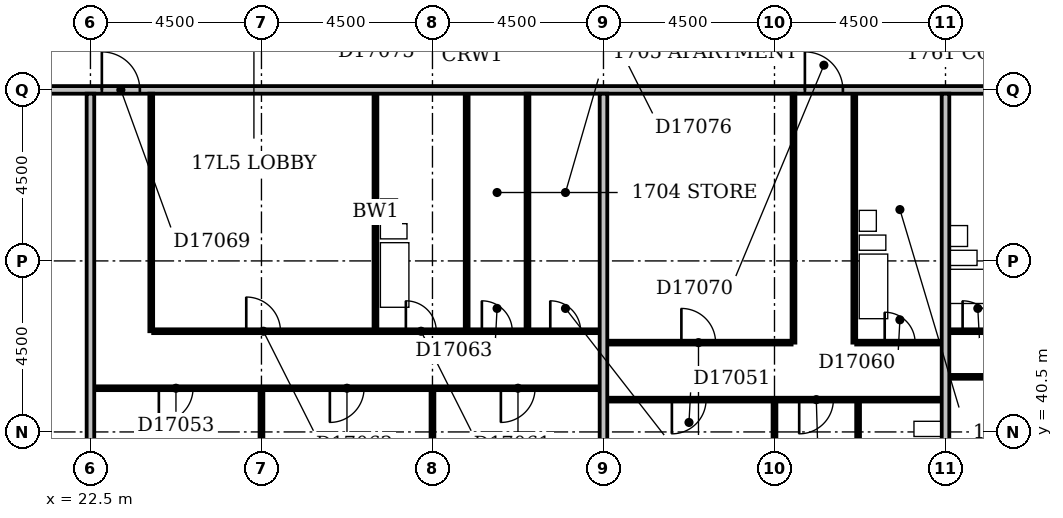
"""IFC4 building model, lengths in metres.
Left out: names, types, materials, properties, quantities, classifications, styles, units other than length and angle.
Written with IfcOpenShell. Run it as: python <this file> out.ifc"""

import sys

from ifc_helpers import new_model, si_unit, direction, frame, frame_2d, origin, place, context, subcontext, project, spatial, rectangle, extrude, element, fill, save


model = new_model("IFC4")
c1 = context("Model", 3, precision=1e-05, world=origin(), true_north=direction((0.0, 1.0)))
c2 = subcontext(c1, "Body", "Model", "MODEL_VIEW")
j1 = project(units=[si_unit("LENGTHUNIT", "METRE"), si_unit("PLANEANGLEUNIT", "RADIAN")], contexts=[c1])
p1 = place(None, origin())
s1 = spatial("IfcSite", under=j1, at=p1, CompositionType="ELEMENT")
p2 = place(p1, origin())
s2 = spatial("IfcBuilding", under=s1, at=p2, CompositionType="ELEMENT")
p3 = place(p2, frame((0.0, 0.0, 72.2)))
s3 = spatial("IfcBuildingStorey", under=s2, at=p3, CompositionType="ELEMENT", Elevation=72.2)
p4 = place(p3, frame((22.5, 36.6, 0.0), z_axis=(0.0, 0.0, 1.0), x_axis=(0.0, 1.0, 0.0)))
e1 = element("IfcWall", 1, at=p4, inside=s3, PredefinedType="PARTITIONING", context=c2, shape_type="SweptSolid", body=[
    extrude(rectangle(XDim=12.8, YDim=0.2, at=frame_2d((6.4, 0.0))), origin(), (0.0, 0.0, 1.0), 3.3),
])
p5 = place(p3, frame((27.0, 36.6, 0.0), z_axis=(0.0, 0.0, 1.0), x_axis=(0.0, 1.0, 0.0)))
e2 = element("IfcWall", 2, at=p5, inside=s3, PredefinedType="PARTITIONING", context=c2, shape_type="SweptSolid", body=[
    extrude(rectangle(XDim=5.0, YDim=0.1, at=frame_2d((2.5, 0.0))), origin(), (0.0, 0.0, 1.0), 2.6),
])
p6 = place(p3, frame((31.5, 36.6, 0.0), z_axis=(0.0, 0.0, 1.0), x_axis=(0.0, 1.0, 0.0)))
e3 = element("IfcWall", 3, at=p6, inside=s3, PredefinedType="PARTITIONING", context=c2, shape_type="SweptSolid", body=[
    extrude(rectangle(XDim=5.0, YDim=0.1, at=frame_2d((2.5, 0.0))), origin(), (0.0, 0.0, 1.0), 3.3),
])
p7 = place(p3, frame((36.0, 36.6, 0.0), z_axis=(0.0, 0.0, 1.0), x_axis=(0.0, 1.0, 0.0)))
e4 = element("IfcWall", 4, at=p7, inside=s3, PredefinedType="PARTITIONING", context=c2, shape_type="SweptSolid", body=[
    extrude(rectangle(XDim=12.8, YDim=0.2, at=frame_2d((6.4, 0.0))), origin(), (0.0, 0.0, 1.0), 2.4),
])
p8 = place(p3, frame((40.5, 36.6, 0.0), z_axis=(0.0, 0.0, 1.0), x_axis=(0.0, 1.0, 0.0)))
e5 = element("IfcWall", 5, at=p8, inside=s3, PredefinedType="PARTITIONING", context=c2, shape_type="SweptSolid", body=[
    extrude(rectangle(XDim=4.7, YDim=0.1, at=frame_2d((2.35, 0.0))), origin(), (0.0, 0.0, 1.0), 3.3),
])
p9 = place(p3, frame((45.0, 36.6, 0.0), z_axis=(0.0, 0.0, 1.0), x_axis=(0.0, 1.0, 0.0)))
e6 = element("IfcWall", 6, at=p9, inside=s3, PredefinedType="PARTITIONING", context=c2, shape_type="SweptSolid", body=[
    extrude(rectangle(XDim=12.8, YDim=0.2, at=frame_2d((6.4, 0.0))), origin(), (0.0, 0.0, 1.0), 2.6),
])
p10 = place(p3, frame((42.7, 38.45, 0.0), z_axis=(0.0, 0.0, 1.0), x_axis=(0.0, 1.0, 0.0)))
e7 = element("IfcWall", 7, at=p10, inside=s3, PredefinedType="PLUMBINGWALL", context=c2, shape_type="SweptSolid", body=[
    extrude(rectangle(XDim=2.85, YDim=0.1, at=frame_2d((1.425, 0.0))), origin(), (0.0, 0.0, 1.0), 3.3),
])
p11 = place(p10, frame((1.05, 0.0, 0.0)))
e8 = element("IfcOpeningElement", 8, at=p11, cuts=e7, PredefinedType="OPENING", context=c2, shape_type="SweptSolid", body=[
    extrude(rectangle(XDim=0.8, YDim=2.1, at=frame_2d((0.4, 1.05))), frame((0.0, 0.062, 0.0), z_axis=(0.0, -1.0, 0.0), x_axis=(1.0, 0.0, 0.0)), (0.0, 0.0, 1.0), 0.124),
])
p12 = place(p3, frame((36.1, 41.35, 0.0), z_axis=(0.0, 0.0, 1.0), x_axis=(1.0, 0.0, 0.0)))
e9 = element("IfcWall", 9, at=p12, inside=s3, PredefinedType="PARTITIONING", context=c2, shape_type="SweptSolid", body=[
    extrude(rectangle(XDim=8.8, YDim=0.1, at=frame_2d((4.4, 0.0))), origin(), (0.0, 0.0, 1.0), 3.3),
])
p13 = place(p12, frame((1.7, 0.0, 0.0)))
e10 = element("IfcOpeningElement", 10, at=p13, cuts=e9, PredefinedType="OPENING", context=c2, shape_type="SweptSolid", body=[
    extrude(rectangle(XDim=0.9, YDim=2.1, at=frame_2d((0.45, 1.05))), frame((0.0, 0.062, 0.0), z_axis=(0.0, -1.0, 0.0), x_axis=(1.0, 0.0, 0.0)), (0.0, 0.0, 1.0), 0.124),
])
p14 = place(p12, frame((5.05, 0.0, 0.0)))
e11 = element("IfcOpeningElement", 11, at=p14, cuts=e9, PredefinedType="OPENING", context=c2, shape_type="SweptSolid", body=[
    extrude(rectangle(XDim=0.9, YDim=2.1, at=frame_2d((0.45, 1.05))), frame((0.0, 0.062, 0.0), z_axis=(0.0, -1.0, 0.0), x_axis=(1.0, 0.0, 0.0)), (0.0, 0.0, 1.0), 0.124),
])
p15 = place(p3, frame((22.6, 41.65, 0.0), z_axis=(0.0, 0.0, 1.0), x_axis=(1.0, 0.0, 0.0)))
e12 = element("IfcWall", 12, at=p15, inside=s3, PredefinedType="PARTITIONING", context=c2, shape_type="SweptSolid", body=[
    extrude(rectangle(XDim=13.3, YDim=0.1, at=frame_2d((6.65, 0.0))), origin(), (0.0, 0.0, 1.0), 3.3),
])
p16 = place(p15, frame((1.7, 0.0, 0.0)))
e13 = element("IfcOpeningElement", 13, at=p16, cuts=e12, PredefinedType="OPENING", context=c2, shape_type="SweptSolid", body=[
    extrude(rectangle(XDim=0.9, YDim=2.1, at=frame_2d((0.45, 1.05))), frame((0.0, 0.062, 0.0), z_axis=(0.0, -1.0, 0.0), x_axis=(1.0, 0.0, 0.0)), (0.0, 0.0, 1.0), 0.124),
])
p17 = place(p15, frame((6.2, 0.0, 0.0)))
e14 = element("IfcOpeningElement", 14, at=p17, cuts=e12, PredefinedType="OPENING", context=c2, shape_type="SweptSolid", body=[
    extrude(rectangle(XDim=0.9, YDim=2.1, at=frame_2d((0.45, 1.05))), frame((0.0, 0.062, 0.0), z_axis=(0.0, -1.0, 0.0), x_axis=(1.0, 0.0, 0.0)), (0.0, 0.0, 1.0), 0.124),
])
p18 = place(p15, frame((10.7, 0.0, 0.0)))
e15 = element("IfcOpeningElement", 15, at=p18, cuts=e12, PredefinedType="OPENING", context=c2, shape_type="SweptSolid", body=[
    extrude(rectangle(XDim=0.9, YDim=2.1, at=frame_2d((0.45, 1.05))), frame((0.0, 0.062, 0.0), z_axis=(0.0, -1.0, 0.0), x_axis=(1.0, 0.0, 0.0)), (0.0, 0.0, 1.0), 0.124),
])
p19 = place(p3, frame((45.1, 41.95, 0.0), z_axis=(0.0, 0.0, 1.0), x_axis=(1.0, 0.0, 0.0)))
e16 = element("IfcWall", 16, at=p19, inside=s3, PredefinedType="PARTITIONING", context=c2, shape_type="SweptSolid", body=[
    extrude(rectangle(XDim=4.3, YDim=0.1, at=frame_2d((2.15, 0.0))), origin(), (0.0, 0.0, 1.0), 3.3),
])
p20 = place(p19, frame((1.7, 0.0, 0.0)))
e17 = element("IfcOpeningElement", 17, at=p20, cuts=e16, PredefinedType="OPENING", context=c2, shape_type="SweptSolid", body=[
    extrude(rectangle(XDim=0.9, YDim=2.1, at=frame_2d((0.45, 1.05))), frame((0.0, 0.062, 0.0), z_axis=(0.0, -1.0, 0.0), x_axis=(1.0, 0.0, 0.0)), (0.0, 0.0, 1.0), 0.124),
])
p21 = place(p3, frame((36.1, 42.85, 0.0), z_axis=(0.0, 0.0, 1.0), x_axis=(1.0, 0.0, 0.0)))
e18 = element("IfcWall", 18, at=p21, inside=s3, PredefinedType="PARTITIONING", context=c2, shape_type="SweptSolid", body=[
    extrude(rectangle(XDim=4.85, YDim=0.1, at=frame_2d((2.425, 0.0))), origin(), (0.0, 0.0, 1.0), 3.3),
])
p22 = place(p21, frame((1.95, 0.0, 0.0)))
e19 = element("IfcOpeningElement", 19, at=p22, cuts=e18, PredefinedType="OPENING", context=c2, shape_type="SweptSolid", body=[
    extrude(rectangle(XDim=0.9, YDim=2.1, at=frame_2d((0.45, 1.05))), frame((0.0, 0.062, 0.0), z_axis=(0.0, -1.0, 0.0), x_axis=(1.0, 0.0, 0.0)), (0.0, 0.0, 1.0), 0.124),
])
p23 = place(p3, frame((41.0, 42.85, 0.0), z_axis=(0.0, 0.0, 1.0), x_axis=(0.0, 1.0, 0.0)))
e20 = element("IfcWall", 20, at=p23, inside=s3, PredefinedType="PARTITIONING", context=c2, shape_type="SweptSolid", body=[
    extrude(rectangle(XDim=6.55, YDim=0.1, at=frame_2d((3.275, 0.0))), origin(), (0.0, 0.0, 1.0), 3.3),
])
p24 = place(p3, frame((42.6, 42.85, 0.0), z_axis=(0.0, 0.0, 1.0), x_axis=(0.0, 1.0, 0.0)))
e21 = element("IfcWall", 21, at=p24, inside=s3, PredefinedType="PLUMBINGWALL", context=c2, shape_type="SweptSolid", body=[
    extrude(rectangle(XDim=6.55, YDim=0.1, at=frame_2d((3.275, 0.0))), origin(), (0.0, 0.0, 1.0), 3.3),
])
p25 = place(p3, frame((42.65, 42.85, 0.0), z_axis=(0.0, 0.0, 1.0), x_axis=(1.0, 0.0, 0.0)))
e22 = element("IfcWall", 22, at=p25, inside=s3, PredefinedType="PARTITIONING", context=c2, shape_type="SweptSolid", body=[
    extrude(rectangle(XDim=2.25, YDim=0.1, at=frame_2d((1.125, 0.0))), origin(), (0.0, 0.0, 1.0), 3.3),
])
p26 = place(p25, frame((0.75, 0.0, 0.0)))
e23 = element("IfcOpeningElement", 23, at=p26, cuts=e22, PredefinedType="OPENING", context=c2, shape_type="SweptSolid", body=[
    extrude(rectangle(XDim=0.8, YDim=2.1, at=frame_2d((0.4, 1.05))), frame((0.0, 0.062, 0.0), z_axis=(0.0, -1.0, 0.0), x_axis=(1.0, 0.0, 0.0)), (0.0, 0.0, 1.0), 0.124),
])
p27 = place(p3, frame((24.1, 43.15, 0.0), z_axis=(0.0, 0.0, 1.0), x_axis=(0.0, 1.0, 0.0)))
e24 = element("IfcWall", 24, at=p27, inside=s3, PredefinedType="PARTITIONING", context=c2, shape_type="SweptSolid", body=[
    extrude(rectangle(XDim=6.25, YDim=0.1, at=frame_2d((3.125, 0.0))), origin(), (0.0, 0.0, 1.0), 3.3),
])
p28 = place(p3, frame((24.15, 43.15, 0.0), z_axis=(0.0, 0.0, 1.0), x_axis=(1.0, 0.0, 0.0)))
e25 = element("IfcWall", 25, at=p28, inside=s3, PredefinedType="PARTITIONING", context=c2, shape_type="SweptSolid", body=[
    extrude(rectangle(XDim=11.75, YDim=0.1, at=frame_2d((5.875, 0.0))), origin(), (0.0, 0.0, 1.0), 3.3),
])
p29 = place(p28, frame((6.65, 0.0, 0.0)))
e26 = element("IfcOpeningElement", 26, at=p29, cuts=e25, PredefinedType="OPENING", context=c2, shape_type="SweptSolid", body=[
    extrude(rectangle(XDim=0.8, YDim=2.1, at=frame_2d((0.4, 1.05))), frame((0.0, 0.062, 0.0), z_axis=(0.0, -1.0, 0.0), x_axis=(1.0, 0.0, 0.0)), (0.0, 0.0, 1.0), 0.124),
])
p30 = place(p28, frame((2.45, 0.0, 0.0)))
e27 = element("IfcOpeningElement", 27, at=p30, cuts=e25, PredefinedType="OPENING", context=c2, shape_type="SweptSolid", body=[
    extrude(rectangle(XDim=0.9, YDim=2.1, at=frame_2d((0.45, 1.05))), frame((0.0, 0.062, 0.0), z_axis=(0.0, -1.0, 0.0), x_axis=(1.0, 0.0, 0.0)), (0.0, 0.0, 1.0), 0.124),
])
p31 = place(p28, frame((8.65, 0.0, 0.0)))
e28 = element("IfcOpeningElement", 28, at=p31, cuts=e25, PredefinedType="OPENING", context=c2, shape_type="SweptSolid", body=[
    extrude(rectangle(XDim=0.8, YDim=2.1, at=frame_2d((0.4, 1.05))), frame((0.0, 0.062, 0.0), z_axis=(0.0, -1.0, 0.0), x_axis=(1.0, 0.0, 0.0)), (0.0, 0.0, 1.0), 0.124),
])
p32 = place(p28, frame((10.45, 0.0, 0.0)))
e29 = element("IfcOpeningElement", 29, at=p32, cuts=e25, PredefinedType="OPENING", context=c2, shape_type="SweptSolid", body=[
    extrude(rectangle(XDim=0.8, YDim=2.1, at=frame_2d((0.4, 1.05))), frame((0.0, 0.062, 0.0), z_axis=(0.0, -1.0, 0.0), x_axis=(1.0, 0.0, 0.0)), (0.0, 0.0, 1.0), 0.124),
])
p33 = place(p3, frame((45.1, 43.15, 0.0), z_axis=(0.0, 0.0, 1.0), x_axis=(1.0, 0.0, 0.0)))
e30 = element("IfcWall", 30, at=p33, inside=s3, PredefinedType="PARTITIONING", context=c2, shape_type="SweptSolid", body=[
    extrude(rectangle(XDim=1.55, YDim=0.1, at=frame_2d((0.775, 0.0))), origin(), (0.0, 0.0, 1.0), 3.3),
])
p34 = place(p33, frame((0.35, 0.0, 0.0)))
e31 = element("IfcOpeningElement", 31, at=p34, cuts=e30, PredefinedType="OPENING", context=c2, shape_type="SweptSolid", body=[
    extrude(rectangle(XDim=0.8, YDim=2.1, at=frame_2d((0.4, 1.05))), frame((0.0, 0.062, 0.0), z_axis=(0.0, -1.0, 0.0), x_axis=(1.0, 0.0, 0.0)), (0.0, 0.0, 1.0), 0.124),
])
for number, where, z_axis, x_axis in (
    (32, (30.0, 43.2, 0.0), (0.0, 0.0, 1.0), (0.0, 1.0, 0.0)),
    (33, (32.4, 43.2, 0.0), (0.0, 0.0, 1.0), (0.0, 1.0, 0.0)),
):
    element("IfcWall", number, at=place(p3, frame(where, z_axis=z_axis, x_axis=x_axis)), inside=s3, PredefinedType="PLUMBINGWALL", context=c2, shape_type="SweptSolid", body=[
        extrude(rectangle(XDim=6.2, YDim=0.1, at=frame_2d((3.1, 0.0))), origin(), (0.0, 0.0, 1.0), 3.3),
    ])
p35 = place(p3, frame((34.0, 43.2, 0.0), z_axis=(0.0, 0.0, 1.0), x_axis=(0.0, 1.0, 0.0)))
e34 = element("IfcWall", 34, at=p35, inside=s3, PredefinedType="PARTITIONING", context=c2, shape_type="SweptSolid", body=[
    extrude(rectangle(XDim=6.2, YDim=0.1, at=frame_2d((3.1, 0.0))), origin(), (0.0, 0.0, 1.0), 3.3),
])
p36 = place(p3, frame((9.1, 49.5, 0.0), z_axis=(0.0, 0.0, 1.0), x_axis=(1.0, 0.0, 0.0)))
e35 = element("IfcWall", 35, at=p36, inside=s3, PredefinedType="PARTITIONING", context=c2, shape_type="SweptSolid", body=[
    extrude(rectangle(XDim=57.8, YDim=0.2, at=frame_2d((28.9, 0.0))), origin(), (0.0, 0.0, 1.0), 3.3),
])
p37 = place(p36, frame((13.7, 0.0, 0.0)))
e36 = element("IfcOpeningElement", 36, at=p37, cuts=e35, PredefinedType="OPENING", context=c2, shape_type="SweptSolid", body=[
    extrude(rectangle(XDim=1.0, YDim=2.1, at=frame_2d((0.5, 1.05))), frame((0.0, 0.112, 0.0), z_axis=(0.0, -1.0, 0.0), x_axis=(1.0, 0.0, 0.0)), (0.0, 0.0, 1.0), 0.224),
])
p38 = place(p36, frame((32.2, 0.0, 0.0)))
e37 = element("IfcOpeningElement", 37, at=p38, cuts=e35, PredefinedType="OPENING", context=c2, shape_type="SweptSolid", body=[
    extrude(rectangle(XDim=1.0, YDim=2.1, at=frame_2d((0.5, 1.05))), frame((0.0, 0.112, 0.0), z_axis=(0.0, -1.0, 0.0), x_axis=(1.0, 0.0, 0.0)), (0.0, 0.0, 1.0), 0.224),
])
p39 = place(p36, frame((37.85, 0.0, 0.0)))
e38 = element("IfcOpeningElement", 38, at=p39, cuts=e35, PredefinedType="OPENING", context=c2, shape_type="SweptSolid", body=[
    extrude(rectangle(XDim=1.0, YDim=2.1, at=frame_2d((0.5, 1.05))), frame((0.0, 0.112, 0.0), z_axis=(0.0, -1.0, 0.0), x_axis=(1.0, 0.0, 0.0)), (0.0, 0.0, 1.0), 0.224),
])
p40 = place(p36, frame((45.7, 0.0, 0.0)))
e39 = element("IfcOpeningElement", 39, at=p40, cuts=e35, PredefinedType="OPENING", context=c2, shape_type="SweptSolid", body=[
    extrude(rectangle(XDim=1.0, YDim=2.1, at=frame_2d((0.5, 1.05))), frame((0.0, 0.112, 0.0), z_axis=(0.0, -1.0, 0.0), x_axis=(1.0, 0.0, 0.0)), (0.0, 0.0, 1.0), 0.224),
])
p41 = place(p36, frame((49.7, 0.0, 0.0)))
e40 = element("IfcOpeningElement", 40, at=p41, cuts=e35, PredefinedType="OPENING", context=c2, shape_type="SweptSolid", body=[
    extrude(rectangle(XDim=1.0, YDim=2.1, at=frame_2d((0.5, 1.05))), frame((0.0, 0.112, 0.0), z_axis=(0.0, -1.0, 0.0), x_axis=(1.0, 0.0, 0.0)), (0.0, 0.0, 1.0), 0.224),
])
p42 = place(p36, frame((8.4, 0.0, 0.0)))
e41 = element("IfcOpeningElement", 41, at=p42, cuts=e35, PredefinedType="OPENING", context=c2, shape_type="SweptSolid", body=[
    extrude(rectangle(XDim=0.9, YDim=2.1, at=frame_2d((0.45, 1.05))), frame((0.0, 0.112, 0.0), z_axis=(0.0, -1.0, 0.0), x_axis=(1.0, 0.0, 0.0)), (0.0, 0.0, 1.0), 0.224),
])
p43 = place(p13, frame((0.9, 0.0, 0.0), z_axis=(0.0, 0.0, 1.0), x_axis=(-1.0, 0.0, 0.0)))
e42 = element("IfcDoor", 42, at=p43, inside=s3, OperationType="SINGLE_SWING_RIGHT", PredefinedType="DOOR", context=c2, shape_type="SweptSolid", body=[
    extrude(rectangle(XDim=0.9, YDim=2.1, at=frame_2d((0.45, 1.05))), frame((0.0, 0.025, 0.0), z_axis=(0.0, -1.0, 0.0), x_axis=(1.0, 0.0, 0.0)), (0.0, 0.0, 1.0), 0.05),
])
fill(e10, e42)
p44 = place(p14, frame((0.9, 0.0, 0.0), z_axis=(0.0, 0.0, 1.0), x_axis=(-1.0, 0.0, 0.0)))
e43 = element("IfcDoor", 43, at=p44, inside=s3, OperationType="SINGLE_SWING_RIGHT", PredefinedType="DOOR", context=c2, shape_type="SweptSolid", body=[
    extrude(rectangle(XDim=0.9, YDim=2.1, at=frame_2d((0.45, 1.05))), frame((0.0, 0.025, 0.0), z_axis=(0.0, -1.0, 0.0), x_axis=(1.0, 0.0, 0.0)), (0.0, 0.0, 1.0), 0.05),
])
fill(e11, e43)
p45 = place(p16, frame((0.9, 0.0, 0.0), z_axis=(0.0, 0.0, 1.0), x_axis=(-1.0, 0.0, 0.0)))
e44 = element("IfcDoor", 44, at=p45, inside=s3, OperationType="SINGLE_SWING_RIGHT", PredefinedType="DOOR", context=c2, shape_type="SweptSolid", body=[
    extrude(rectangle(XDim=0.9, YDim=2.1, at=frame_2d((0.45, 1.05))), frame((0.0, 0.025, 0.0), z_axis=(0.0, -1.0, 0.0), x_axis=(1.0, 0.0, 0.0)), (0.0, 0.0, 1.0), 0.05),
])
fill(e13, e44)
p46 = place(p17, frame((0.9, 0.0, 0.0), z_axis=(0.0, 0.0, 1.0), x_axis=(-1.0, 0.0, 0.0)))
e45 = element("IfcDoor", 45, at=p46, inside=s3, OperationType="SINGLE_SWING_RIGHT", PredefinedType="DOOR", context=c2, shape_type="SweptSolid", body=[
    extrude(rectangle(XDim=0.9, YDim=2.1, at=frame_2d((0.45, 1.05))), frame((0.0, 0.025, 0.0), z_axis=(0.0, -1.0, 0.0), x_axis=(1.0, 0.0, 0.0)), (0.0, 0.0, 1.0), 0.05),
])
fill(e14, e45)
p47 = place(p18, frame((0.9, 0.0, 0.0), z_axis=(0.0, 0.0, 1.0), x_axis=(-1.0, 0.0, 0.0)))
e46 = element("IfcDoor", 46, at=p47, inside=s3, OperationType="SINGLE_SWING_RIGHT", PredefinedType="DOOR", context=c2, shape_type="SweptSolid", body=[
    extrude(rectangle(XDim=0.9, YDim=2.1, at=frame_2d((0.45, 1.05))), frame((0.0, 0.025, 0.0), z_axis=(0.0, -1.0, 0.0), x_axis=(1.0, 0.0, 0.0)), (0.0, 0.0, 1.0), 0.05),
])
fill(e15, e46)
p48 = place(p22, origin())
e47 = element("IfcDoor", 47, at=p48, inside=s3, OperationType="SINGLE_SWING_LEFT", PredefinedType="DOOR", context=c2, shape_type="SweptSolid", body=[
    extrude(rectangle(XDim=0.9, YDim=2.1, at=frame_2d((0.45, 1.05))), frame((0.0, 0.025, 0.0), z_axis=(0.0, -1.0, 0.0), x_axis=(1.0, 0.0, 0.0)), (0.0, 0.0, 1.0), 0.05),
])
fill(e19, e47)
p49 = place(p26, origin())
e48 = element("IfcDoor", 48, at=p49, inside=s3, OperationType="SINGLE_SWING_LEFT", PredefinedType="DOOR", context=c2, shape_type="SweptSolid", body=[
    extrude(rectangle(XDim=0.8, YDim=2.1, at=frame_2d((0.4, 1.05))), frame((0.0, 0.025, 0.0), z_axis=(0.0, -1.0, 0.0), x_axis=(1.0, 0.0, 0.0)), (0.0, 0.0, 1.0), 0.05),
])
fill(e23, e48)
p50 = place(p29, origin())
e49 = element("IfcDoor", 49, at=p50, inside=s3, OperationType="SINGLE_SWING_LEFT", PredefinedType="DOOR", context=c2, shape_type="SweptSolid", body=[
    extrude(rectangle(XDim=0.8, YDim=2.1, at=frame_2d((0.4, 1.05))), frame((0.0, 0.025, 0.0), z_axis=(0.0, -1.0, 0.0), x_axis=(1.0, 0.0, 0.0)), (0.0, 0.0, 1.0), 0.05),
])
fill(e26, e49)
p51 = place(p30, origin())
e50 = element("IfcDoor", 50, at=p51, inside=s3, OperationType="SINGLE_SWING_LEFT", PredefinedType="DOOR", context=c2, shape_type="SweptSolid", body=[
    extrude(rectangle(XDim=0.9, YDim=2.1, at=frame_2d((0.45, 1.05))), frame((0.0, 0.025, 0.0), z_axis=(0.0, -1.0, 0.0), x_axis=(1.0, 0.0, 0.0)), (0.0, 0.0, 1.0), 0.05),
])
fill(e27, e50)
p52 = place(p31, origin())
e51 = element("IfcDoor", 51, at=p52, inside=s3, OperationType="SINGLE_SWING_LEFT", PredefinedType="DOOR", context=c2, shape_type="SweptSolid", body=[
    extrude(rectangle(XDim=0.8, YDim=2.1, at=frame_2d((0.4, 1.05))), frame((0.0, 0.025, 0.0), z_axis=(0.0, -1.0, 0.0), x_axis=(1.0, 0.0, 0.0)), (0.0, 0.0, 1.0), 0.05),
])
fill(e28, e51)
p53 = place(p32, origin())
e52 = element("IfcDoor", 52, at=p53, inside=s3, OperationType="SINGLE_SWING_LEFT", PredefinedType="DOOR", context=c2, shape_type="SweptSolid", body=[
    extrude(rectangle(XDim=0.8, YDim=2.1, at=frame_2d((0.4, 1.05))), frame((0.0, 0.025, 0.0), z_axis=(0.0, -1.0, 0.0), x_axis=(1.0, 0.0, 0.0)), (0.0, 0.0, 1.0), 0.05),
])
fill(e29, e52)
p54 = place(p34, origin())
e53 = element("IfcDoor", 53, at=p54, inside=s3, OperationType="SINGLE_SWING_LEFT", PredefinedType="DOOR", context=c2, shape_type="SweptSolid", body=[
    extrude(rectangle(XDim=0.8, YDim=2.1, at=frame_2d((0.4, 1.05))), frame((0.0, 0.025, 0.0), z_axis=(0.0, -1.0, 0.0), x_axis=(1.0, 0.0, 0.0)), (0.0, 0.0, 1.0), 0.05),
])
fill(e31, e53)
p55 = place(p37, origin())
e54 = element("IfcDoor", 54, at=p55, inside=s3, OperationType="SINGLE_SWING_LEFT", PredefinedType="DOOR", context=c2, shape_type="SweptSolid", body=[
    extrude(rectangle(XDim=1.0, YDim=2.1, at=frame_2d((0.5, 1.05))), frame((0.0, 0.025, 0.0), z_axis=(0.0, -1.0, 0.0), x_axis=(1.0, 0.0, 0.0)), (0.0, 0.0, 1.0), 0.05),
])
fill(e36, e54)
p56 = place(p38, origin())
e55 = element("IfcDoor", 55, at=p56, inside=s3, OperationType="SINGLE_SWING_LEFT", PredefinedType="DOOR", context=c2, shape_type="SweptSolid", body=[
    extrude(rectangle(XDim=1.0, YDim=2.1, at=frame_2d((0.5, 1.05))), frame((0.0, 0.025, 0.0), z_axis=(0.0, -1.0, 0.0), x_axis=(1.0, 0.0, 0.0)), (0.0, 0.0, 1.0), 0.05),
])
fill(e37, e55)
save(model, sys.argv[1])
